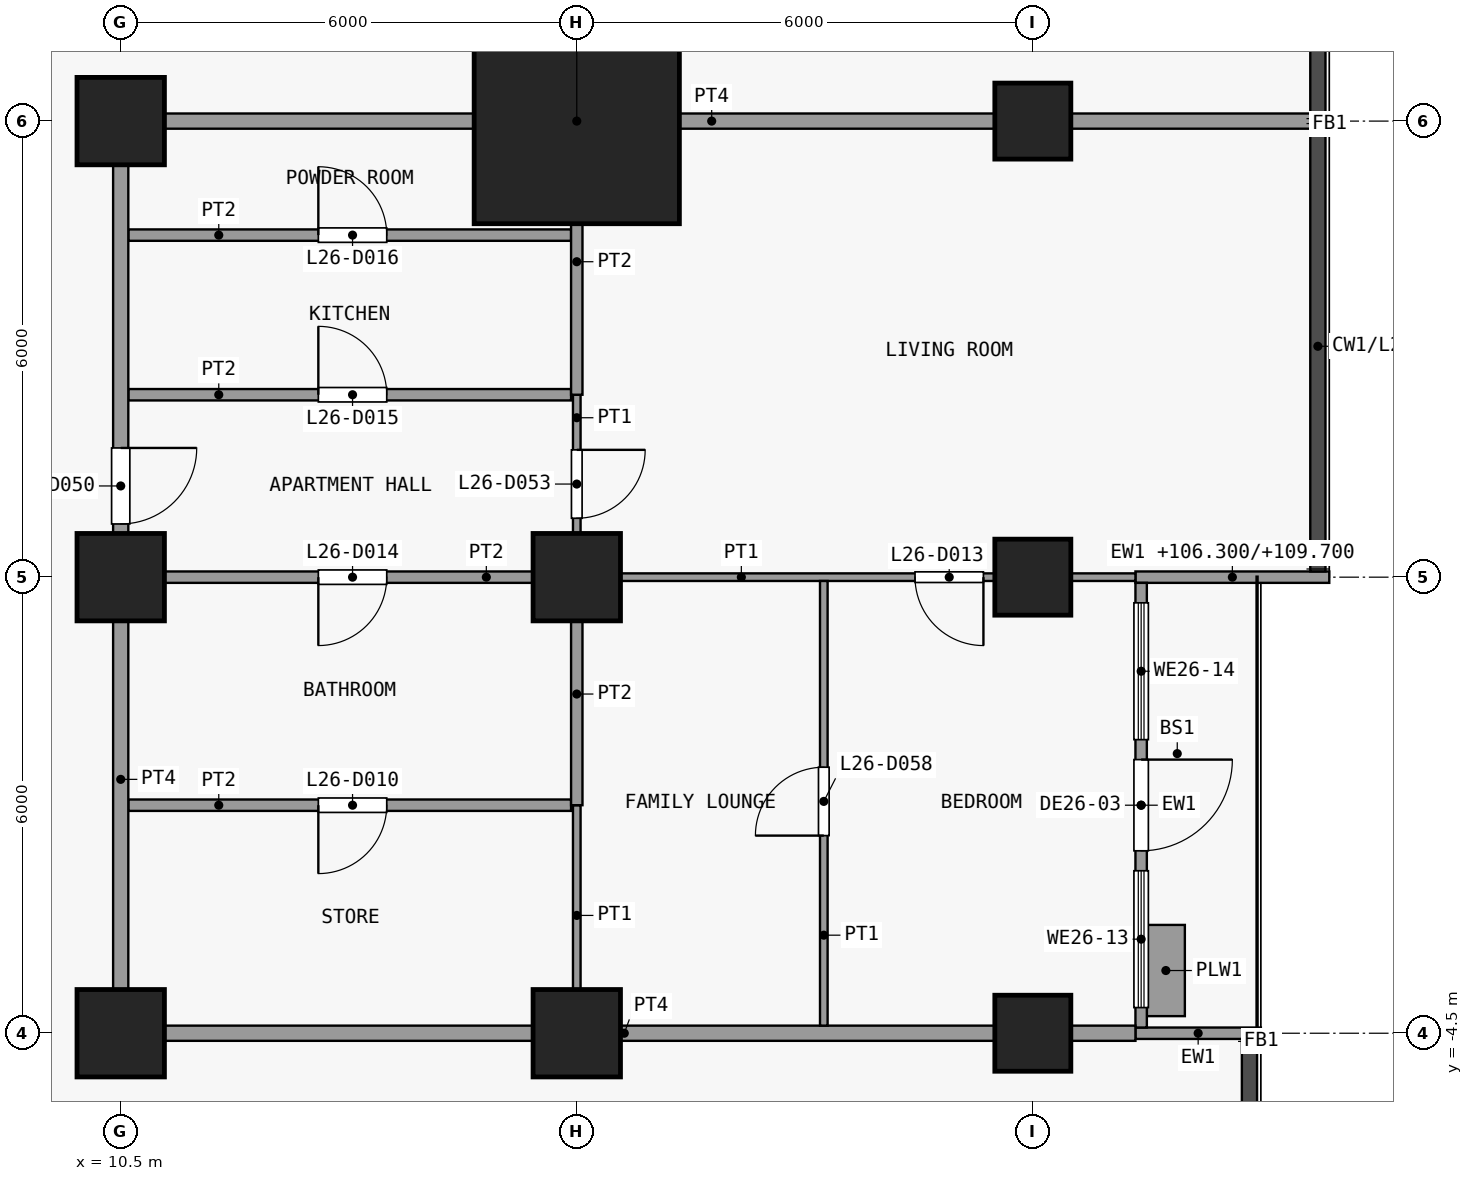
"""IFC4 building model, lengths in metres.
Left out: names, types, materials, properties, quantities, classifications, styles, units other than length and angle.
Written with IfcOpenShell. Run it as: python <this file> out.ifc"""

import sys

from ifc_helpers import new_model, si_unit, direction, frame, frame_2d, origin, origin_2d, place, context, subcontext, project, spatial, rectangle, extrude, element, fill, save


model = new_model("IFC4")
c1 = context("Model", 3, precision=1e-05, world=origin(), true_north=direction((0.0, 1.0)))
c2 = subcontext(c1, "Body", "Model", "MODEL_VIEW")
j1 = project(units=[si_unit("LENGTHUNIT", "METRE"), si_unit("PLANEANGLEUNIT", "RADIAN")], contexts=[c1])
p1 = place(None, origin())
s1 = spatial("IfcSite", under=j1, at=p1, CompositionType="ELEMENT")
p2 = place(p1, origin())
s2 = spatial("IfcBuilding", under=s1, at=p2, CompositionType="ELEMENT")
p3 = place(p2, frame((0.0, 0.0, 106.3)))
s3 = spatial("IfcBuildingStorey", under=s2, at=p3, CompositionType="ELEMENT", Elevation=106.3)
for number, where, z_axis, x_axis in (
    (1, (10.5, -4.5, 0.0), (0.0, 0.0, 1.0), (1.0, 0.0, 0.0)),
    (2, (10.5, 1.5, 0.0), (0.0, 0.0, 1.0), (1.0, 0.0, 0.0)),
    (3, (10.5, 7.5, 0.0), (0.0, 0.0, 1.0), (1.0, 0.0, 0.0)),
    (4, (16.5, -4.5, 0.0), (0.0, 0.0, 1.0), (1.0, 0.0, 0.0)),
    (5, (16.5, 1.5, 0.0), (0.0, 0.0, 1.0), (1.0, 0.0, 0.0)),
):
    element("IfcColumn", number, at=place(p3, frame(where, z_axis=z_axis, x_axis=x_axis)), inside=s3, PredefinedType="COLUMN", context=c2, shape_type="SweptSolid", body=[
        extrude(rectangle(XDim=1.15, YDim=1.15, at=origin_2d()), origin(), (0.0, 0.0, 1.0), 3.6),
    ])
p4 = place(p3, frame((16.5, 7.5, 0.0), z_axis=(0.0, 0.0, 1.0), x_axis=(1.0, 0.0, 0.0)))
e6 = element("IfcColumn", 6, at=p4, inside=s3, PredefinedType="COLUMN", context=c2, shape_type="SweptSolid", body=[
    extrude(rectangle(XDim=2.7, YDim=2.7, at=origin_2d()), origin(), (0.0, 0.0, 1.0), 3.6),
])
for number, where, z_axis, x_axis in (
    (7, (22.5, -4.5, 0.0), (0.0, 0.0, 1.0), (1.0, 0.0, 0.0)),
    (8, (22.5, 1.5, 0.0), (0.0, 0.0, 1.0), (1.0, 0.0, 0.0)),
    (9, (22.5, 7.5, 0.0), (0.0, 0.0, 1.0), (1.0, 0.0, 0.0)),
):
    element("IfcColumn", number, at=place(p3, frame(where, z_axis=z_axis, x_axis=x_axis)), inside=s3, PredefinedType="COLUMN", context=c2, shape_type="SweptSolid", body=[
        extrude(rectangle(XDim=1.0, YDim=1.0, at=origin_2d()), origin(), (0.0, 0.0, 1.0), 3.6),
    ])
p5 = place(p3, frame((23.85, -4.5, 0.0), z_axis=(0.0, 0.0, 1.0), x_axis=(1.0, 0.0, 0.0)))
e10 = element("IfcWall", 10, at=p5, inside=s3, PredefinedType="SOLIDWALL", context=c2, shape_type="SweptSolid", body=[
    extrude(rectangle(XDim=1.65, YDim=0.15, at=frame_2d((0.825, 0.0))), origin(), (0.0, 0.0, 1.0), 3.3),
])
p6 = place(p3, frame((23.85, 1.5, 0.0), z_axis=(0.0, 0.0, 1.0), x_axis=(1.0, 0.0, 0.0)))
e11 = element("IfcWall", 11, at=p6, inside=s3, PredefinedType="SOLIDWALL", context=c2, shape_type="SweptSolid", body=[
    extrude(rectangle(XDim=2.55, YDim=0.15, at=frame_2d((1.275, 0.0))), origin(), (0.0, 0.0, 1.0), 3.4),
])
p7 = place(p3, frame((23.925, 1.425, 0.0), z_axis=(0.0, 0.0, 1.0), x_axis=(0.0, -1.0, 0.0)))
e12 = element("IfcWall", 12, at=p7, inside=s3, PredefinedType="SOLIDWALL", context=c2, shape_type="SweptSolid", body=[
    extrude(rectangle(XDim=5.85, YDim=0.15, at=frame_2d((2.925, 0.0))), origin(), (0.0, 0.0, 1.0), 3.3),
])
p8 = place(p7, frame((2.325, 0.0, 0.0)))
e13 = element("IfcOpeningElement", 13, at=p8, cuts=e12, PredefinedType="OPENING", context=c2, shape_type="SweptSolid", body=[
    extrude(rectangle(XDim=1.2, YDim=2.4, at=frame_2d((0.6, 1.2))), frame((0.0, 0.085, 0.0), z_axis=(0.0, -1.0, 0.0), x_axis=(1.0, 0.0, 0.0)), (0.0, 0.0, 1.0), 0.17),
])
p9 = place(p7, frame((3.788, 0.0, 0.9)))
e14 = element("IfcOpeningElement", 14, at=p9, cuts=e12, PredefinedType="OPENING", context=c2, shape_type="SweptSolid", body=[
    extrude(rectangle(XDim=1.8, YDim=2.1, at=frame_2d((0.9, 1.05))), frame((0.0, 0.085, 0.0), z_axis=(0.0, -1.0, 0.0), x_axis=(1.0, 0.0, 0.0)), (0.0, 0.0, 1.0), 0.17),
])
p10 = place(p7, frame((0.262, 0.0, 0.9)))
e15 = element("IfcOpeningElement", 15, at=p10, cuts=e12, PredefinedType="OPENING", context=c2, shape_type="SweptSolid", body=[
    extrude(rectangle(XDim=1.8, YDim=2.1, at=frame_2d((0.9, 1.05))), frame((0.0, 0.085, 0.0), z_axis=(0.0, -1.0, 0.0), x_axis=(1.0, 0.0, 0.0)), (0.0, 0.0, 1.0), 0.17),
])
p11 = place(p3, frame((24.25, -4.275, 0.0), z_axis=(0.0, 0.0, 1.0), x_axis=(0.0, 1.0, 0.0)))
e16 = element("IfcWall", 16, at=p11, inside=s3, PredefinedType="USERDEFINED", context=c2, shape_type="SweptSolid", body=[
    extrude(rectangle(XDim=1.2, YDim=0.5, at=frame_2d((0.6, 0.0))), origin(), (0.0, 0.0, 1.0), 0.9),
])
p12 = place(p3, frame((10.4, -4.5, 0.0), z_axis=(0.0, 0.0, 1.0), x_axis=(1.0, 0.0, 0.0)))
e17 = element("IfcWall", 17, at=p12, inside=s3, PredefinedType="PARTITIONING", context=c2, shape_type="SweptSolid", body=[
    extrude(rectangle(XDim=13.45, YDim=0.2, at=frame_2d((6.725, 0.0))), origin(), (0.0, 0.0, 1.0), 3.3),
])
p13 = place(p3, frame((10.6, -1.5, 0.0), z_axis=(0.0, 0.0, 1.0), x_axis=(1.0, 0.0, 0.0)))
e18 = element("IfcWall", 18, at=p13, inside=s3, PredefinedType="PARTITIONING", context=c2, shape_type="SweptSolid", body=[
    extrude(rectangle(XDim=5.825, YDim=0.15, at=frame_2d((2.913, 0.0))), origin(), (0.0, 0.0, 1.0), 3.3),
])
p14 = place(p13, frame((2.5, 0.0, 0.0)))
e19 = element("IfcOpeningElement", 19, at=p14, cuts=e18, PredefinedType="OPENING", context=c2, shape_type="SweptSolid", body=[
    extrude(rectangle(XDim=0.9, YDim=2.1, at=frame_2d((0.45, 1.05))), frame((0.0, 0.085, 0.0), z_axis=(0.0, -1.0, 0.0), x_axis=(1.0, 0.0, 0.0)), (0.0, 0.0, 1.0), 0.17),
])
p15 = place(p3, frame((16.5, 1.5, 0.0), z_axis=(0.0, 0.0, 1.0), x_axis=(1.0, 0.0, 0.0)))
e20 = element("IfcWall", 20, at=p15, inside=s3, PredefinedType="PARTITIONING", context=c2, shape_type="SweptSolid", body=[
    extrude(rectangle(XDim=7.35, YDim=0.1, at=frame_2d((3.675, 0.0))), origin(), (0.0, 0.0, 1.0), 3.3),
])
p16 = place(p15, frame((4.45, 0.0, 0.0)))
e21 = element("IfcOpeningElement", 21, at=p16, cuts=e20, PredefinedType="OPENING", context=c2, shape_type="SweptSolid", body=[
    extrude(rectangle(XDim=0.9, YDim=2.1, at=frame_2d((0.45, 1.05))), frame((0.0, 0.06, 0.0), z_axis=(0.0, -1.0, 0.0), x_axis=(1.0, 0.0, 0.0)), (0.0, 0.0, 1.0), 0.12),
])
p17 = place(p3, frame((10.6, 1.5, 0.0), z_axis=(0.0, 0.0, 1.0), x_axis=(1.0, 0.0, 0.0)))
e22 = element("IfcWall", 22, at=p17, inside=s3, PredefinedType="PARTITIONING", context=c2, shape_type="SweptSolid", body=[
    extrude(rectangle(XDim=5.9, YDim=0.15, at=frame_2d((2.95, 0.0))), origin(), (0.0, 0.0, 1.0), 3.3),
])
p18 = place(p17, frame((2.5, 0.0, 0.0)))
e23 = element("IfcOpeningElement", 23, at=p18, cuts=e22, PredefinedType="OPENING", context=c2, shape_type="SweptSolid", body=[
    extrude(rectangle(XDim=0.9, YDim=2.1, at=frame_2d((0.45, 1.05))), frame((0.0, 0.085, 0.0), z_axis=(0.0, -1.0, 0.0), x_axis=(1.0, 0.0, 0.0)), (0.0, 0.0, 1.0), 0.17),
])
p19 = place(p3, frame((10.6, 3.9, 0.0), z_axis=(0.0, 0.0, 1.0), x_axis=(1.0, 0.0, 0.0)))
e24 = element("IfcWall", 24, at=p19, inside=s3, PredefinedType="PARTITIONING", context=c2, shape_type="SweptSolid", body=[
    extrude(rectangle(XDim=5.825, YDim=0.15, at=frame_2d((2.913, 0.0))), origin(), (0.0, 0.0, 1.0), 3.3),
])
p20 = place(p19, frame((2.5, 0.0, 0.0)))
e25 = element("IfcOpeningElement", 25, at=p20, cuts=e24, PredefinedType="OPENING", context=c2, shape_type="SweptSolid", body=[
    extrude(rectangle(XDim=0.9, YDim=2.1, at=frame_2d((0.45, 1.05))), frame((0.0, 0.085, 0.0), z_axis=(0.0, -1.0, 0.0), x_axis=(1.0, 0.0, 0.0)), (0.0, 0.0, 1.0), 0.17),
])
p21 = place(p3, frame((10.6, 6.0, 0.0), z_axis=(0.0, 0.0, 1.0), x_axis=(1.0, 0.0, 0.0)))
e26 = element("IfcWall", 26, at=p21, inside=s3, PredefinedType="PARTITIONING", context=c2, shape_type="SweptSolid", body=[
    extrude(rectangle(XDim=5.825, YDim=0.15, at=frame_2d((2.913, 0.0))), origin(), (0.0, 0.0, 1.0), 3.3),
])
p22 = place(p21, frame((2.5, 0.0, 0.0)))
e27 = element("IfcOpeningElement", 27, at=p22, cuts=e26, PredefinedType="OPENING", context=c2, shape_type="SweptSolid", body=[
    extrude(rectangle(XDim=0.9, YDim=2.1, at=frame_2d((0.45, 1.05))), frame((0.0, 0.085, 0.0), z_axis=(0.0, -1.0, 0.0), x_axis=(1.0, 0.0, 0.0)), (0.0, 0.0, 1.0), 0.17),
])
p23 = place(p3, frame((10.4, 7.5, 0.0), z_axis=(0.0, 0.0, 1.0), x_axis=(1.0, 0.0, 0.0)))
e28 = element("IfcWall", 28, at=p23, inside=s3, PredefinedType="PARTITIONING", context=c2, shape_type="SweptSolid", body=[
    extrude(rectangle(XDim=15.75, YDim=0.2, at=frame_2d((7.875, 0.0))), origin(), (0.0, 0.0, 1.0), 3.3),
])
p24 = place(p3, frame((10.5, -4.4, 0.0), z_axis=(0.0, 0.0, 1.0), x_axis=(0.0, 1.0, 0.0)))
e29 = element("IfcWall", 29, at=p24, inside=s3, PredefinedType="PARTITIONING", context=c2, shape_type="SweptSolid", body=[
    extrude(rectangle(XDim=11.8, YDim=0.2, at=frame_2d((5.9, 0.0))), origin(), (0.0, 0.0, 1.0), 3.3),
])
p25 = place(p24, frame((6.6, 0.0, 0.0)))
e30 = element("IfcOpeningElement", 30, at=p25, cuts=e29, PredefinedType="OPENING", context=c2, shape_type="SweptSolid", body=[
    extrude(rectangle(XDim=1.0, YDim=2.1, at=frame_2d((0.5, 1.05))), frame((0.0, 0.11, 0.0), z_axis=(0.0, -1.0, 0.0), x_axis=(1.0, 0.0, 0.0)), (0.0, 0.0, 1.0), 0.22),
])
p26 = place(p3, frame((16.5, -4.4, 0.0), z_axis=(0.0, 0.0, 1.0), x_axis=(0.0, 1.0, 0.0)))
e31 = element("IfcWall", 31, at=p26, inside=s3, PredefinedType="PARTITIONING", context=c2, shape_type="SweptSolid", body=[
    extrude(rectangle(XDim=2.9, YDim=0.1, at=frame_2d((1.45, 0.0))), origin(), (0.0, 0.0, 1.0), 3.3),
])
p27 = place(p3, frame((16.5, 1.575, 0.0), z_axis=(0.0, 0.0, 1.0), x_axis=(0.0, 1.0, 0.0)))
e32 = element("IfcWall", 32, at=p27, inside=s3, PredefinedType="PARTITIONING", context=c2, shape_type="SweptSolid", body=[
    extrude(rectangle(XDim=2.325, YDim=0.1, at=frame_2d((1.163, 0.0))), origin(), (0.0, 0.0, 1.0), 3.3),
])
p28 = place(p27, frame((0.7, 0.0, 0.0)))
e33 = element("IfcOpeningElement", 33, at=p28, cuts=e32, PredefinedType="OPENING", context=c2, shape_type="SweptSolid", body=[
    extrude(rectangle(XDim=0.9, YDim=2.1, at=frame_2d((0.45, 1.05))), frame((0.0, 0.06, 0.0), z_axis=(0.0, -1.0, 0.0), x_axis=(1.0, 0.0, 0.0)), (0.0, 0.0, 1.0), 0.12),
])
p29 = place(p3, frame((16.5, -1.5, 0.0), z_axis=(0.0, 0.0, 1.0), x_axis=(0.0, 1.0, 0.0)))
e34 = element("IfcWall", 34, at=p29, inside=s3, PredefinedType="PARTITIONING", context=c2, shape_type="SweptSolid", body=[
    extrude(rectangle(XDim=2.925, YDim=0.15, at=frame_2d((1.462, 0.0))), origin(), (0.0, 0.0, 1.0), 3.3),
])
p30 = place(p3, frame((16.5, 3.9, 0.0), z_axis=(0.0, 0.0, 1.0), x_axis=(0.0, 1.0, 0.0)))
e35 = element("IfcWall", 35, at=p30, inside=s3, PredefinedType="PARTITIONING", context=c2, shape_type="SweptSolid", body=[
    extrude(rectangle(XDim=3.5, YDim=0.15, at=frame_2d((1.75, 0.0))), origin(), (0.0, 0.0, 1.0), 3.3),
])
p31 = place(p3, frame((19.75, -4.4, 0.0), z_axis=(0.0, 0.0, 1.0), x_axis=(0.0, 1.0, 0.0)))
e36 = element("IfcWall", 36, at=p31, inside=s3, PredefinedType="PARTITIONING", context=c2, shape_type="SweptSolid", body=[
    extrude(rectangle(XDim=5.85, YDim=0.1, at=frame_2d((2.925, 0.0))), origin(), (0.0, 0.0, 1.0), 3.3),
])
p32 = place(p31, frame((2.5, 0.0, 0.0)))
e37 = element("IfcOpeningElement", 37, at=p32, cuts=e36, PredefinedType="OPENING", context=c2, shape_type="SweptSolid", body=[
    extrude(rectangle(XDim=0.9, YDim=2.1, at=frame_2d((0.45, 1.05))), frame((0.0, 0.06, 0.0), z_axis=(0.0, -1.0, 0.0), x_axis=(1.0, 0.0, 0.0)), (0.0, 0.0, 1.0), 0.12),
])
p33 = place(p8, origin())
e38 = element("IfcDoor", 38, at=p33, inside=s3, OperationType="SINGLE_SWING_LEFT", PredefinedType="DOOR", context=c2, shape_type="SweptSolid", body=[
    extrude(rectangle(XDim=1.2, YDim=2.4, at=frame_2d((0.6, 1.2))), frame((0.0, 0.025, 0.0), z_axis=(0.0, -1.0, 0.0), x_axis=(1.0, 0.0, 0.0)), (0.0, 0.0, 1.0), 0.05),
])
fill(e13, e38)
p34 = place(p9, origin())
e39 = element("IfcWindow", 39, at=p34, inside=s3, PartitioningType="SINGLE_PANEL", PredefinedType="WINDOW", context=c2, shape_type="SweptSolid", body=[
    extrude(rectangle(XDim=1.8, YDim=2.1, at=frame_2d((0.9, 1.05))), frame((0.0, 0.03, 0.0), z_axis=(0.0, -1.0, 0.0), x_axis=(1.0, 0.0, 0.0)), (0.0, 0.0, 1.0), 0.06),
])
fill(e14, e39)
p35 = place(p10, origin())
e40 = element("IfcWindow", 40, at=p35, inside=s3, PartitioningType="SINGLE_PANEL", PredefinedType="WINDOW", context=c2, shape_type="SweptSolid", body=[
    extrude(rectangle(XDim=1.8, YDim=2.1, at=frame_2d((0.9, 1.05))), frame((0.0, 0.03, 0.0), z_axis=(0.0, -1.0, 0.0), x_axis=(1.0, 0.0, 0.0)), (0.0, 0.0, 1.0), 0.06),
])
fill(e15, e40)
p36 = place(p14, origin())
e41 = element("IfcDoor", 41, at=p36, inside=s3, OperationType="SINGLE_SWING_LEFT", PredefinedType="DOOR", context=c2, shape_type="SweptSolid", body=[
    extrude(rectangle(XDim=0.9, YDim=2.1, at=frame_2d((0.45, 1.05))), frame((0.0, 0.025, 0.0), z_axis=(0.0, -1.0, 0.0), x_axis=(1.0, 0.0, 0.0)), (0.0, 0.0, 1.0), 0.05),
])
fill(e19, e41)
p37 = place(p16, origin())
e42 = element("IfcDoor", 42, at=p37, inside=s3, OperationType="SINGLE_SWING_RIGHT", PredefinedType="DOOR", context=c2, shape_type="SweptSolid", body=[
    extrude(rectangle(XDim=0.9, YDim=2.1, at=frame_2d((0.45, 1.05))), frame((0.0, 0.025, 0.0), z_axis=(0.0, -1.0, 0.0), x_axis=(1.0, 0.0, 0.0)), (0.0, 0.0, 1.0), 0.05),
])
fill(e21, e42)
p38 = place(p18, origin())
e43 = element("IfcDoor", 43, at=p38, inside=s3, OperationType="SINGLE_SWING_LEFT", PredefinedType="DOOR", context=c2, shape_type="SweptSolid", body=[
    extrude(rectangle(XDim=0.9, YDim=2.1, at=frame_2d((0.45, 1.05))), frame((0.0, 0.025, 0.0), z_axis=(0.0, -1.0, 0.0), x_axis=(1.0, 0.0, 0.0)), (0.0, 0.0, 1.0), 0.05),
])
fill(e23, e43)
p39 = place(p20, origin())
e44 = element("IfcDoor", 44, at=p39, inside=s3, OperationType="SINGLE_SWING_RIGHT", PredefinedType="DOOR", context=c2, shape_type="SweptSolid", body=[
    extrude(rectangle(XDim=0.9, YDim=2.1, at=frame_2d((0.45, 1.05))), frame((0.0, 0.025, 0.0), z_axis=(0.0, -1.0, 0.0), x_axis=(1.0, 0.0, 0.0)), (0.0, 0.0, 1.0), 0.05),
])
fill(e25, e44)
p40 = place(p22, origin())
e45 = element("IfcDoor", 45, at=p40, inside=s3, OperationType="SINGLE_SWING_RIGHT", PredefinedType="DOOR", context=c2, shape_type="SweptSolid", body=[
    extrude(rectangle(XDim=0.9, YDim=2.1, at=frame_2d((0.45, 1.05))), frame((0.0, 0.025, 0.0), z_axis=(0.0, -1.0, 0.0), x_axis=(1.0, 0.0, 0.0)), (0.0, 0.0, 1.0), 0.05),
])
fill(e27, e45)
p41 = place(p25, origin())
e46 = element("IfcDoor", 46, at=p41, inside=s3, OperationType="SINGLE_SWING_RIGHT", PredefinedType="DOOR", context=c2, shape_type="SweptSolid", body=[
    extrude(rectangle(XDim=1.0, YDim=2.1, at=frame_2d((0.5, 1.05))), frame((0.0, 0.025, 0.0), z_axis=(0.0, -1.0, 0.0), x_axis=(1.0, 0.0, 0.0)), (0.0, 0.0, 1.0), 0.05),
])
fill(e30, e46)
p42 = place(p28, origin())
e47 = element("IfcDoor", 47, at=p42, inside=s3, OperationType="SINGLE_SWING_RIGHT", PredefinedType="DOOR", context=c2, shape_type="SweptSolid", body=[
    extrude(rectangle(XDim=0.9, YDim=2.1, at=frame_2d((0.45, 1.05))), frame((0.0, 0.025, 0.0), z_axis=(0.0, -1.0, 0.0), x_axis=(1.0, 0.0, 0.0)), (0.0, 0.0, 1.0), 0.05),
])
fill(e33, e47)
p43 = place(p32, origin())
e48 = element("IfcDoor", 48, at=p43, inside=s3, OperationType="SINGLE_SWING_RIGHT", PredefinedType="DOOR", context=c2, shape_type="SweptSolid", body=[
    extrude(rectangle(XDim=0.9, YDim=2.1, at=frame_2d((0.45, 1.05))), frame((0.0, 0.025, 0.0), z_axis=(0.0, -1.0, 0.0), x_axis=(1.0, 0.0, 0.0)), (0.0, 0.0, 1.0), 0.05),
])
fill(e37, e48)
save(model, sys.argv[1])
